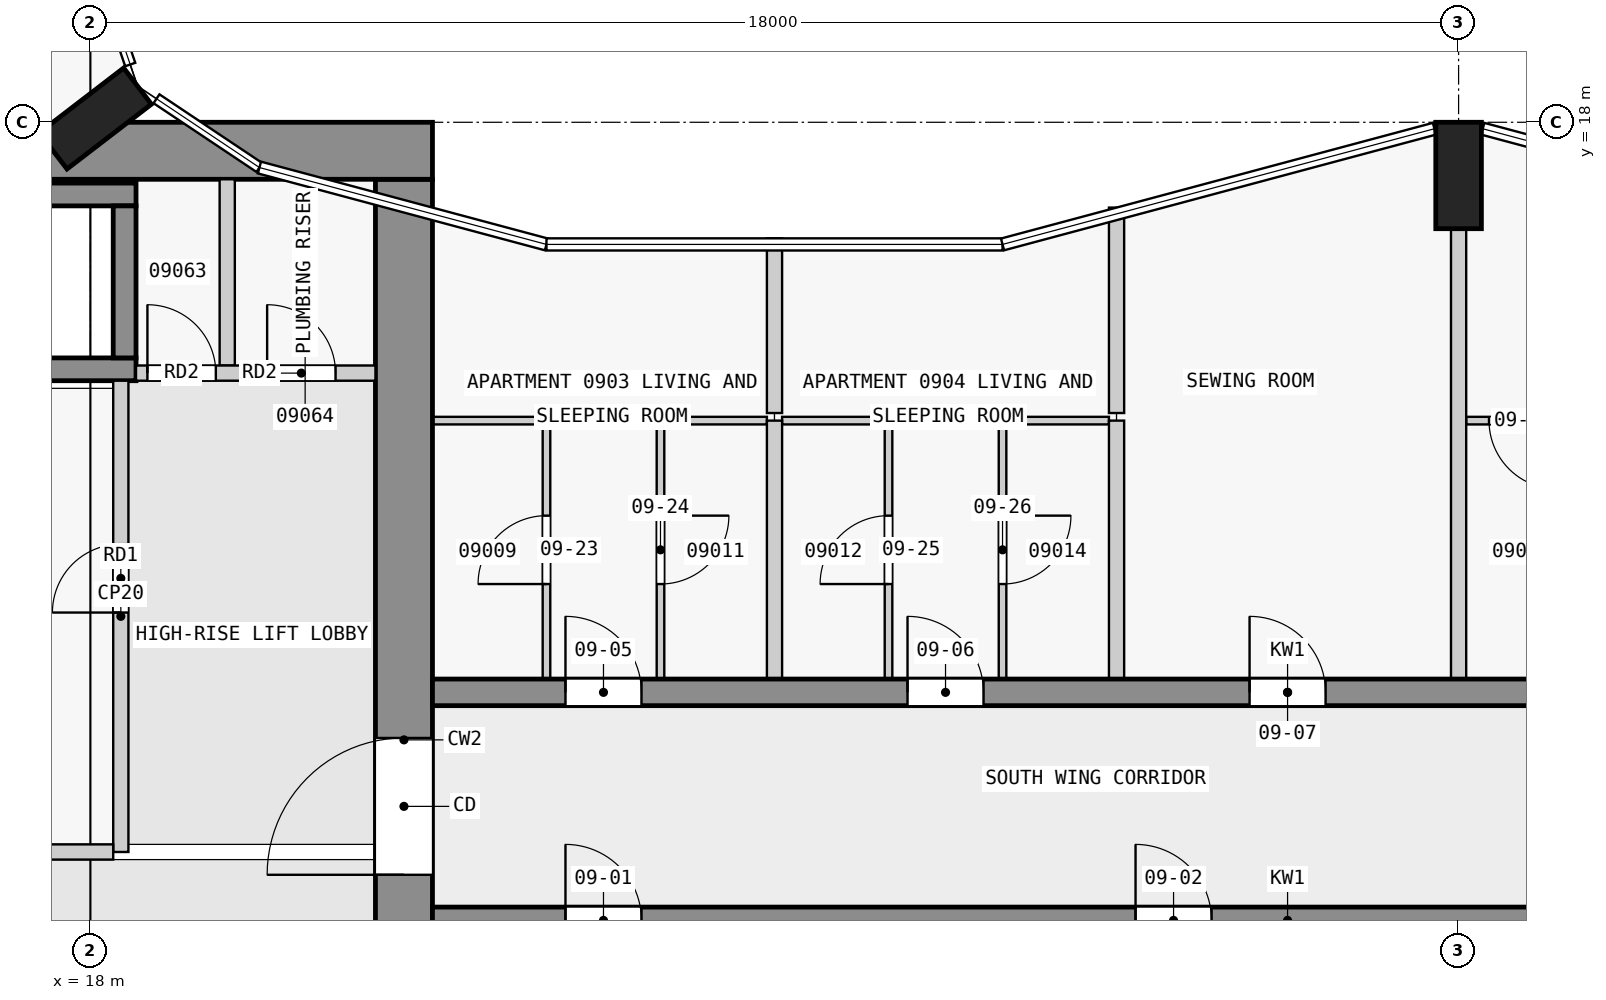
"""IFC4 building model, lengths in metres.
Left out: names, types, materials, properties, quantities, classifications, styles, units other than length and angle.
Written with IfcOpenShell. Run it as: python <this file> out.ifc"""

import sys

from ifc_helpers import new_model, si_unit, direction, frame, frame_2d, origin, origin_2d, place, context, subcontext, project, spatial, rectangle, extrude, element, fill, save


model = new_model("IFC4")
c1 = context("Model", 3, precision=1e-05, world=origin(), true_north=direction((0.0, 1.0)))
c2 = subcontext(c1, "Body", "Model", "MODEL_VIEW")
j1 = project(units=[si_unit("LENGTHUNIT", "METRE"), si_unit("PLANEANGLEUNIT", "RADIAN")], contexts=[c1])
p1 = place(None, origin())
s1 = spatial("IfcSite", under=j1, at=p1, CompositionType="ELEMENT")
p2 = place(p1, origin())
s2 = spatial("IfcBuilding", under=s1, at=p2, CompositionType="ELEMENT")
p3 = place(p2, frame((0.0, 0.0, 40.8)))
s3 = spatial("IfcBuildingStorey", under=s2, at=p3, CompositionType="ELEMENT", Elevation=40.8)
for number, where, z_axis, x_axis in (
    (1, (36.0, 17.3, 0.0), (0.0, 0.0, 1.0), (1.0, 0.0, 0.0)),
    (2, (18.065, 18.05, 0.0), (0.0, 0.0, 1.0), (-0.609, 0.793, 0.0)),
):
    element("IfcColumn", number, at=place(p3, frame(where, z_axis=z_axis, x_axis=x_axis)), inside=s3, PredefinedType="COLUMN", context=c2, shape_type="SweptSolid", body=[
        extrude(rectangle(XDim=0.6, YDim=1.4, at=origin_2d()), origin(), (0.0, 0.0, 1.0), 3.5),
    ])
p4 = place(p3, frame((1.55, 17.625, 0.0), z_axis=(0.0, 0.0, 1.0), x_axis=(1.0, 0.0, 0.0)))
e3 = element("IfcWall", 3, at=p4, inside=s3, PredefinedType="SHEAR", context=c2, shape_type="SweptSolid", body=[
    extrude(rectangle(XDim=20.95, YDim=0.75, at=frame_2d((10.475, 0.0))), origin(), (0.0, 0.0, 1.0), 3.25),
])
p5 = place(p4, frame((6.55, 0.0, 0.0)))
e4 = element("IfcOpeningElement", 4, at=p5, cuts=e3, PredefinedType="OPENING", context=c2, shape_type="SweptSolid", body=[
    extrude(rectangle(XDim=1.8, YDim=2.1, at=frame_2d((0.9, 1.05))), frame((0.0, 0.385, 0.0), z_axis=(0.0, -1.0, 0.0), x_axis=(1.0, 0.0, 0.0)), (0.0, 0.0, 1.0), 0.77),
])
p6 = place(p3, frame((22.125, 2.5, 0.0), z_axis=(0.0, 0.0, 1.0), x_axis=(0.0, 1.0, 0.0)))
e5 = element("IfcWall", 5, at=p6, inside=s3, PredefinedType="SHEAR", context=c2, shape_type="SweptSolid", body=[
    extrude(rectangle(XDim=14.75, YDim=0.75, at=frame_2d((7.375, 0.0))), origin(), (0.0, 0.0, 1.0), 3.25),
])
p7 = place(p6, frame((5.6, 0.0, 0.0)))
e6 = element("IfcOpeningElement", 6, at=p7, cuts=e5, PredefinedType="OPENING", context=c2, shape_type="SweptSolid", body=[
    extrude(rectangle(XDim=1.8, YDim=2.1, at=frame_2d((0.9, 1.05))), frame((0.0, 0.385, 0.0), z_axis=(0.0, -1.0, 0.0), x_axis=(1.0, 0.0, 0.0)), (0.0, 0.0, 1.0), 0.77),
])
for number, where, z_axis, x_axis in (
    (7, (10.8, 17.05, 0.0), (0.0, 0.0, 1.0), (1.0, 0.0, 0.0)),
    (8, (10.8, 14.75, 0.0), (0.0, 0.0, 1.0), (1.0, 0.0, 0.0)),
):
    element("IfcWall", number, at=place(p3, frame(where, z_axis=z_axis, x_axis=x_axis)), inside=s3, PredefinedType="SHEAR", context=c2, shape_type="SweptSolid", body=[
        extrude(rectangle(XDim=7.8, YDim=0.3, at=frame_2d((3.9, 0.0))), origin(), (0.0, 0.0, 1.0), 3.25),
    ])
p8 = place(p3, frame((18.45, 14.9, 0.0), z_axis=(0.0, 0.0, 1.0), x_axis=(0.0, 1.0, 0.0)))
e9 = element("IfcWall", 9, at=p8, inside=s3, PredefinedType="SHEAR", context=c2, shape_type="SweptSolid", body=[
    extrude(rectangle(XDim=2.0, YDim=0.3, at=frame_2d((1.0, 0.0))), origin(), (0.0, 0.0, 1.0), 3.25),
])
p9 = place(p3, frame((22.5, 7.5, 0.0), z_axis=(0.0, 0.0, 1.0), x_axis=(1.0, 0.0, 0.0)))
e10 = element("IfcWall", 10, at=p9, inside=s3, PredefinedType="SHEAR", context=c2, shape_type="SweptSolid", body=[
    extrude(rectangle(XDim=22.5, YDim=0.35, at=frame_2d((11.25, 0.0))), origin(), (0.0, 0.0, 1.0), 3.25),
])
p10 = place(p9, frame((1.75, 0.0, 0.0)))
e11 = element("IfcOpeningElement", 11, at=p10, cuts=e10, PredefinedType="OPENING", context=c2, shape_type="SweptSolid", body=[
    extrude(rectangle(XDim=1.0, YDim=2.1, at=frame_2d((0.5, 1.05))), frame((0.0, 0.185, 0.0), z_axis=(0.0, -1.0, 0.0), x_axis=(1.0, 0.0, 0.0)), (0.0, 0.0, 1.0), 0.37),
])
p11 = place(p9, frame((9.25, 0.0, 0.0)))
e12 = element("IfcOpeningElement", 12, at=p11, cuts=e10, PredefinedType="OPENING", context=c2, shape_type="SweptSolid", body=[
    extrude(rectangle(XDim=1.0, YDim=2.1, at=frame_2d((0.5, 1.05))), frame((0.0, 0.185, 0.0), z_axis=(0.0, -1.0, 0.0), x_axis=(1.0, 0.0, 0.0)), (0.0, 0.0, 1.0), 0.37),
])
p12 = place(p9, frame((18.75, 0.0, 0.0)))
e13 = element("IfcOpeningElement", 13, at=p12, cuts=e10, PredefinedType="OPENING", context=c2, shape_type="SweptSolid", body=[
    extrude(rectangle(XDim=0.9, YDim=2.1, at=frame_2d((0.45, 1.05))), frame((0.0, 0.185, 0.0), z_axis=(0.0, -1.0, 0.0), x_axis=(1.0, 0.0, 0.0)), (0.0, 0.0, 1.0), 0.37),
])
p13 = place(p9, frame((20.95, 0.0, 0.0)))
e14 = element("IfcOpeningElement", 14, at=p13, cuts=e10, PredefinedType="OPENING", context=c2, shape_type="SweptSolid", body=[
    extrude(rectangle(XDim=1.0, YDim=2.1, at=frame_2d((0.5, 1.05))), frame((0.0, 0.185, 0.0), z_axis=(0.0, -1.0, 0.0), x_axis=(1.0, 0.0, 0.0)), (0.0, 0.0, 1.0), 0.37),
])
p14 = place(p3, frame((22.5, 10.5, 0.0), z_axis=(0.0, 0.0, 1.0), x_axis=(1.0, 0.0, 0.0)))
e15 = element("IfcWall", 15, at=p14, inside=s3, PredefinedType="SHEAR", context=c2, shape_type="SweptSolid", body=[
    extrude(rectangle(XDim=22.5, YDim=0.35, at=frame_2d((11.25, 0.0))), origin(), (0.0, 0.0, 1.0), 3.25),
])
p15 = place(p14, frame((1.75, 0.0, 0.0)))
e16 = element("IfcOpeningElement", 16, at=p15, cuts=e15, PredefinedType="OPENING", context=c2, shape_type="SweptSolid", body=[
    extrude(rectangle(XDim=1.0, YDim=2.1, at=frame_2d((0.5, 1.05))), frame((0.0, 0.185, 0.0), z_axis=(0.0, -1.0, 0.0), x_axis=(1.0, 0.0, 0.0)), (0.0, 0.0, 1.0), 0.37),
])
p16 = place(p14, frame((6.25, 0.0, 0.0)))
e17 = element("IfcOpeningElement", 17, at=p16, cuts=e15, PredefinedType="OPENING", context=c2, shape_type="SweptSolid", body=[
    extrude(rectangle(XDim=1.0, YDim=2.1, at=frame_2d((0.5, 1.05))), frame((0.0, 0.185, 0.0), z_axis=(0.0, -1.0, 0.0), x_axis=(1.0, 0.0, 0.0)), (0.0, 0.0, 1.0), 0.37),
])
p17 = place(p14, frame((10.75, 0.0, 0.0)))
e18 = element("IfcOpeningElement", 18, at=p17, cuts=e15, PredefinedType="OPENING", context=c2, shape_type="SweptSolid", body=[
    extrude(rectangle(XDim=1.0, YDim=2.1, at=frame_2d((0.5, 1.05))), frame((0.0, 0.185, 0.0), z_axis=(0.0, -1.0, 0.0), x_axis=(1.0, 0.0, 0.0)), (0.0, 0.0, 1.0), 0.37),
])
p18 = place(p14, frame((16.85, 0.0, 0.0)))
e19 = element("IfcOpeningElement", 19, at=p18, cuts=e15, PredefinedType="OPENING", context=c2, shape_type="SweptSolid", body=[
    extrude(rectangle(XDim=1.0, YDim=2.1, at=frame_2d((0.5, 1.05))), frame((0.0, 0.185, 0.0), z_axis=(0.0, -1.0, 0.0), x_axis=(1.0, 0.0, 0.0)), (0.0, 0.0, 1.0), 0.37),
])
p19 = place(p3, frame((10.9, 8.4, 0.0), z_axis=(0.0, 0.0, 1.0), x_axis=(1.0, 0.0, 0.0)))
e20 = element("IfcWall", 20, at=p19, inside=s3, PredefinedType="PARTITIONING", context=c2, shape_type="SweptSolid", body=[
    extrude(rectangle(XDim=7.4, YDim=0.2, at=frame_2d((3.7, 0.0))), origin(), (0.0, 0.0, 1.0), 3.25),
])
p20 = place(p3, frame((18.4, 8.4, 0.0), z_axis=(0.0, 0.0, 1.0), x_axis=(0.0, 1.0, 0.0)))
e21 = element("IfcWall", 21, at=p20, inside=s3, PredefinedType="PARTITIONING", context=c2, shape_type="SweptSolid", body=[
    extrude(rectangle(XDim=6.2, YDim=0.2, at=frame_2d((3.1, 0.0))), origin(), (0.0, 0.0, 1.0), 3.25),
])
p21 = place(p20, frame((3.15, 0.0, 0.0)))
e22 = element("IfcOpeningElement", 22, at=p21, cuts=e21, PredefinedType="OPENING", context=c2, shape_type="SweptSolid", body=[
    extrude(rectangle(XDim=0.9, YDim=2.1, at=frame_2d((0.45, 1.05))), frame((0.0, 0.11, 0.0), z_axis=(0.0, -1.0, 0.0), x_axis=(1.0, 0.0, 0.0)), (0.0, 0.0, 1.0), 0.22),
])
p22 = place(p3, frame((18.6, 14.7, 0.0), z_axis=(0.0, 0.0, 1.0), x_axis=(1.0, 0.0, 0.0)))
e23 = element("IfcWall", 23, at=p22, inside=s3, PredefinedType="PARTITIONING", context=c2, shape_type="SweptSolid", body=[
    extrude(rectangle(XDim=3.15, YDim=0.2, at=frame_2d((1.575, 0.0))), origin(), (0.0, 0.0, 1.0), 3.25),
])
p23 = place(p22, frame((0.15, 0.0, 0.0)))
e24 = element("IfcOpeningElement", 24, at=p23, cuts=e23, PredefinedType="OPENING", context=c2, shape_type="SweptSolid", body=[
    extrude(rectangle(XDim=0.9, YDim=2.1, at=frame_2d((0.45, 1.05))), frame((0.0, 0.11, 0.0), z_axis=(0.0, -1.0, 0.0), x_axis=(1.0, 0.0, 0.0)), (0.0, 0.0, 1.0), 0.22),
])
p24 = place(p22, frame((1.725, 0.0, 0.0)))
e25 = element("IfcOpeningElement", 25, at=p24, cuts=e23, PredefinedType="OPENING", context=c2, shape_type="SweptSolid", body=[
    extrude(rectangle(XDim=0.9, YDim=2.1, at=frame_2d((0.45, 1.05))), frame((0.0, 0.11, 0.0), z_axis=(0.0, -1.0, 0.0), x_axis=(1.0, 0.0, 0.0)), (0.0, 0.0, 1.0), 0.22),
])
p25 = place(p3, frame((19.8, 14.8, 0.0), z_axis=(0.0, 0.0, 1.0), x_axis=(0.0, 1.0, 0.0)))
e26 = element("IfcWall", 26, at=p25, inside=s3, PredefinedType="PARTITIONING", context=c2, shape_type="SweptSolid", body=[
    extrude(rectangle(XDim=2.45, YDim=0.2, at=frame_2d((1.225, 0.0))), origin(), (0.0, 0.0, 1.0), 3.25),
])
p26 = place(p3, frame((23.95, 14.075, 0.0), z_axis=(0.0, 0.0, 1.0), x_axis=(-1.0, 0.0, 0.0)))
e27 = element("IfcWall", 27, at=p26, inside=s3, PredefinedType="PARTITIONING", context=c2, shape_type="SweptSolid", body=[
    extrude(rectangle(XDim=1.45, YDim=0.1, at=frame_2d((0.725, 0.0))), origin(), (0.0, 0.0, 1.0), 3.25),
])
for number, where, z_axis, x_axis in (
    (28, (26.9, 14.075, 0.0), (0.0, 0.0, 1.0), (-1.0, 0.0, 0.0)),
    (29, (28.45, 14.075, 0.0), (0.0, 0.0, 1.0), (-1.0, 0.0, 0.0)),
    (30, (31.4, 14.075, 0.0), (0.0, 0.0, 1.0), (-1.0, 0.0, 0.0)),
):
    element("IfcWall", number, at=place(p3, frame(where, z_axis=z_axis, x_axis=x_axis)), inside=s3, PredefinedType="PARTITIONING", context=c2, shape_type="SweptSolid", body=[
        extrude(rectangle(XDim=1.35, YDim=0.1, at=frame_2d((0.675, 0.0))), origin(), (0.0, 0.0, 1.0), 3.25),
    ])
p27 = place(p3, frame((37.55, 14.075, 0.0), z_axis=(0.0, 0.0, 1.0), x_axis=(-1.0, 0.0, 0.0)))
e31 = element("IfcWall", 31, at=p27, inside=s3, PredefinedType="PARTITIONING", context=c2, shape_type="SweptSolid", body=[
    extrude(rectangle(XDim=1.45, YDim=0.1, at=frame_2d((0.725, 0.0))), origin(), (0.0, 0.0, 1.0), 3.25),
])
p28 = place(p27, frame((0.25, 0.0, 0.0)))
e32 = element("IfcOpeningElement", 32, at=p28, cuts=e31, PredefinedType="OPENING", context=c2, shape_type="SweptSolid", body=[
    extrude(rectangle(XDim=0.9, YDim=2.1, at=frame_2d((0.45, 1.05))), frame((0.0, 0.06, 0.0), z_axis=(0.0, -1.0, 0.0), x_axis=(1.0, 0.0, 0.0)), (0.0, 0.0, 1.0), 0.12),
])
p29 = place(p3, frame((24.0, 10.675, 0.0), z_axis=(0.0, 0.0, 1.0), x_axis=(0.0, 1.0, 0.0)))
e33 = element("IfcWall", 33, at=p29, inside=s3, PredefinedType="PARTITIONING", context=c2, shape_type="SweptSolid", body=[
    extrude(rectangle(XDim=3.4, YDim=0.1, at=frame_2d((1.7, 0.0))), origin(), (0.0, 0.0, 1.0), 3.25),
])
p30 = place(p29, frame((1.25, 0.0, 0.0)))
e34 = element("IfcOpeningElement", 34, at=p30, cuts=e33, PredefinedType="OPENING", context=c2, shape_type="SweptSolid", body=[
    extrude(rectangle(XDim=0.9, YDim=2.1, at=frame_2d((0.45, 1.05))), frame((0.0, 0.06, 0.0), z_axis=(0.0, -1.0, 0.0), x_axis=(1.0, 0.0, 0.0)), (0.0, 0.0, 1.0), 0.12),
])
p31 = place(p3, frame((25.5, 14.075, 0.0), z_axis=(0.0, 0.0, 1.0), x_axis=(0.0, -1.0, 0.0)))
e35 = element("IfcWall", 35, at=p31, inside=s3, PredefinedType="PARTITIONING", context=c2, shape_type="SweptSolid", body=[
    extrude(rectangle(XDim=3.4, YDim=0.1, at=frame_2d((1.7, 0.0))), origin(), (0.0, 0.0, 1.0), 3.25),
])
p32 = place(p31, frame((1.25, 0.0, 0.0)))
e36 = element("IfcOpeningElement", 36, at=p32, cuts=e35, PredefinedType="OPENING", context=c2, shape_type="SweptSolid", body=[
    extrude(rectangle(XDim=0.9, YDim=2.1, at=frame_2d((0.45, 1.05))), frame((0.0, 0.06, 0.0), z_axis=(0.0, -1.0, 0.0), x_axis=(1.0, 0.0, 0.0)), (0.0, 0.0, 1.0), 0.12),
])
p33 = place(p3, frame((27.0, 16.473, 0.0), z_axis=(0.0, 0.0, 1.0), x_axis=(0.0, -1.0, 0.0)))
e37 = element("IfcWall", 37, at=p33, inside=s3, PredefinedType="PARTITIONING", context=c2, shape_type="SweptSolid", body=[
    extrude(rectangle(XDim=2.298, YDim=0.2, at=frame_2d((1.149, 0.0))), origin(), (0.0, 0.0, 1.0), 3.25),
])
p34 = place(p3, frame((27.0, 10.675, 0.0), z_axis=(0.0, 0.0, 1.0), x_axis=(0.0, 1.0, 0.0)))
e38 = element("IfcWall", 38, at=p34, inside=s3, PredefinedType="PARTITIONING", context=c2, shape_type="SweptSolid", body=[
    extrude(rectangle(XDim=3.4, YDim=0.2, at=frame_2d((1.7, 0.0))), origin(), (0.0, 0.0, 1.0), 3.25),
])
p35 = place(p3, frame((28.5, 10.675, 0.0), z_axis=(0.0, 0.0, 1.0), x_axis=(0.0, 1.0, 0.0)))
e39 = element("IfcWall", 39, at=p35, inside=s3, PredefinedType="PARTITIONING", context=c2, shape_type="SweptSolid", body=[
    extrude(rectangle(XDim=3.4, YDim=0.1, at=frame_2d((1.7, 0.0))), origin(), (0.0, 0.0, 1.0), 3.25),
])
p36 = place(p35, frame((1.25, 0.0, 0.0)))
e40 = element("IfcOpeningElement", 40, at=p36, cuts=e39, PredefinedType="OPENING", context=c2, shape_type="SweptSolid", body=[
    extrude(rectangle(XDim=0.9, YDim=2.1, at=frame_2d((0.45, 1.05))), frame((0.0, 0.06, 0.0), z_axis=(0.0, -1.0, 0.0), x_axis=(1.0, 0.0, 0.0)), (0.0, 0.0, 1.0), 0.12),
])
p37 = place(p3, frame((30.0, 14.075, 0.0), z_axis=(0.0, 0.0, 1.0), x_axis=(0.0, -1.0, 0.0)))
e41 = element("IfcWall", 41, at=p37, inside=s3, PredefinedType="PARTITIONING", context=c2, shape_type="SweptSolid", body=[
    extrude(rectangle(XDim=3.4, YDim=0.1, at=frame_2d((1.7, 0.0))), origin(), (0.0, 0.0, 1.0), 3.25),
])
p38 = place(p37, frame((1.25, 0.0, 0.0)))
e42 = element("IfcOpeningElement", 42, at=p38, cuts=e41, PredefinedType="OPENING", context=c2, shape_type="SweptSolid", body=[
    extrude(rectangle(XDim=0.9, YDim=2.1, at=frame_2d((0.45, 1.05))), frame((0.0, 0.06, 0.0), z_axis=(0.0, -1.0, 0.0), x_axis=(1.0, 0.0, 0.0)), (0.0, 0.0, 1.0), 0.12),
])
p39 = place(p3, frame((31.5, 16.878, 0.0), z_axis=(0.0, 0.0, 1.0), x_axis=(0.0, -1.0, 0.0)))
e43 = element("IfcWall", 43, at=p39, inside=s3, PredefinedType="PARTITIONING", context=c2, shape_type="SweptSolid", body=[
    extrude(rectangle(XDim=2.703, YDim=0.2, at=frame_2d((1.351, 0.0))), origin(), (0.0, 0.0, 1.0), 3.25),
])
p40 = place(p3, frame((31.5, 10.675, 0.0), z_axis=(0.0, 0.0, 1.0), x_axis=(0.0, 1.0, 0.0)))
e44 = element("IfcWall", 44, at=p40, inside=s3, PredefinedType="PARTITIONING", context=c2, shape_type="SweptSolid", body=[
    extrude(rectangle(XDim=3.4, YDim=0.2, at=frame_2d((1.7, 0.0))), origin(), (0.0, 0.0, 1.0), 3.25),
])
p41 = place(p3, frame((36.0, 10.675, 0.0), z_axis=(0.0, 0.0, 1.0), x_axis=(0.0, 1.0, 0.0)))
e45 = element("IfcWall", 45, at=p41, inside=s3, PredefinedType="PARTITIONING", context=c2, shape_type="SweptSolid", body=[
    extrude(rectangle(XDim=5.925, YDim=0.2, at=frame_2d((2.962, 0.0))), origin(), (0.0, 0.0, 1.0), 3.25),
])
p42 = place(p21, origin())
e46 = element("IfcDoor", 46, at=p42, inside=s3, OperationType="SINGLE_SWING_LEFT", PredefinedType="DOOR", context=c2, shape_type="SweptSolid", body=[
    extrude(rectangle(XDim=0.9, YDim=2.1, at=frame_2d((0.45, 1.05))), frame((0.0, 0.025, 0.0), z_axis=(0.0, -1.0, 0.0), x_axis=(1.0, 0.0, 0.0)), (0.0, 0.0, 1.0), 0.05),
])
fill(e22, e46)
p43 = place(p7, origin())
e47 = element("IfcDoor", 47, at=p43, inside=s3, OperationType="DOUBLE_DOOR_SINGLE_SWING", PredefinedType="DOOR", context=c2, shape_type="SweptSolid", body=[
    extrude(rectangle(XDim=1.8, YDim=2.1, at=frame_2d((0.9, 1.05))), frame((0.0, 0.025, 0.0), z_axis=(0.0, -1.0, 0.0), x_axis=(1.0, 0.0, 0.0)), (0.0, 0.0, 1.0), 0.05),
])
fill(e6, e47)
p44 = place(p23, origin())
e48 = element("IfcDoor", 48, at=p44, inside=s3, OperationType="SINGLE_SWING_LEFT", PredefinedType="DOOR", context=c2, shape_type="SweptSolid", body=[
    extrude(rectangle(XDim=0.9, YDim=2.1, at=frame_2d((0.45, 1.05))), frame((0.0, 0.025, 0.0), z_axis=(0.0, -1.0, 0.0), x_axis=(1.0, 0.0, 0.0)), (0.0, 0.0, 1.0), 0.05),
])
fill(e24, e48)
p45 = place(p24, origin())
e49 = element("IfcDoor", 49, at=p45, inside=s3, OperationType="SINGLE_SWING_LEFT", PredefinedType="DOOR", context=c2, shape_type="SweptSolid", body=[
    extrude(rectangle(XDim=0.9, YDim=2.1, at=frame_2d((0.45, 1.05))), frame((0.0, 0.025, 0.0), z_axis=(0.0, -1.0, 0.0), x_axis=(1.0, 0.0, 0.0)), (0.0, 0.0, 1.0), 0.05),
])
fill(e25, e49)
p46 = place(p10, origin())
e50 = element("IfcDoor", 50, at=p46, inside=s3, OperationType="SINGLE_SWING_LEFT", PredefinedType="DOOR", context=c2, shape_type="SweptSolid", body=[
    extrude(rectangle(XDim=1.0, YDim=2.1, at=frame_2d((0.5, 1.05))), frame((0.0, 0.025, 0.0), z_axis=(0.0, -1.0, 0.0), x_axis=(1.0, 0.0, 0.0)), (0.0, 0.0, 1.0), 0.05),
])
fill(e11, e50)
p47 = place(p11, origin())
e51 = element("IfcDoor", 51, at=p47, inside=s3, OperationType="SINGLE_SWING_LEFT", PredefinedType="DOOR", context=c2, shape_type="SweptSolid", body=[
    extrude(rectangle(XDim=1.0, YDim=2.1, at=frame_2d((0.5, 1.05))), frame((0.0, 0.025, 0.0), z_axis=(0.0, -1.0, 0.0), x_axis=(1.0, 0.0, 0.0)), (0.0, 0.0, 1.0), 0.05),
])
fill(e12, e51)
p48 = place(p15, origin())
e52 = element("IfcDoor", 52, at=p48, inside=s3, OperationType="SINGLE_SWING_LEFT", PredefinedType="DOOR", context=c2, shape_type="SweptSolid", body=[
    extrude(rectangle(XDim=1.0, YDim=2.1, at=frame_2d((0.5, 1.05))), frame((0.0, 0.025, 0.0), z_axis=(0.0, -1.0, 0.0), x_axis=(1.0, 0.0, 0.0)), (0.0, 0.0, 1.0), 0.05),
])
fill(e16, e52)
p49 = place(p16, origin())
e53 = element("IfcDoor", 53, at=p49, inside=s3, OperationType="SINGLE_SWING_LEFT", PredefinedType="DOOR", context=c2, shape_type="SweptSolid", body=[
    extrude(rectangle(XDim=1.0, YDim=2.1, at=frame_2d((0.5, 1.05))), frame((0.0, 0.025, 0.0), z_axis=(0.0, -1.0, 0.0), x_axis=(1.0, 0.0, 0.0)), (0.0, 0.0, 1.0), 0.05),
])
fill(e17, e53)
p50 = place(p17, origin())
e54 = element("IfcDoor", 54, at=p50, inside=s3, OperationType="SINGLE_SWING_LEFT", PredefinedType="DOOR", context=c2, shape_type="SweptSolid", body=[
    extrude(rectangle(XDim=1.0, YDim=2.1, at=frame_2d((0.5, 1.05))), frame((0.0, 0.025, 0.0), z_axis=(0.0, -1.0, 0.0), x_axis=(1.0, 0.0, 0.0)), (0.0, 0.0, 1.0), 0.05),
])
fill(e18, e54)
p51 = place(p30, origin())
e55 = element("IfcDoor", 55, at=p51, inside=s3, OperationType="SINGLE_SWING_RIGHT", PredefinedType="DOOR", context=c2, shape_type="SweptSolid", body=[
    extrude(rectangle(XDim=0.9, YDim=2.1, at=frame_2d((0.45, 1.05))), frame((0.0, 0.025, 0.0), z_axis=(0.0, -1.0, 0.0), x_axis=(1.0, 0.0, 0.0)), (0.0, 0.0, 1.0), 0.05),
])
fill(e34, e55)
p52 = place(p32, origin())
e56 = element("IfcDoor", 56, at=p52, inside=s3, OperationType="SINGLE_SWING_RIGHT", PredefinedType="DOOR", context=c2, shape_type="SweptSolid", body=[
    extrude(rectangle(XDim=0.9, YDim=2.1, at=frame_2d((0.45, 1.05))), frame((0.0, 0.025, 0.0), z_axis=(0.0, -1.0, 0.0), x_axis=(1.0, 0.0, 0.0)), (0.0, 0.0, 1.0), 0.05),
])
fill(e36, e56)
p53 = place(p36, origin())
e57 = element("IfcDoor", 57, at=p53, inside=s3, OperationType="SINGLE_SWING_RIGHT", PredefinedType="DOOR", context=c2, shape_type="SweptSolid", body=[
    extrude(rectangle(XDim=0.9, YDim=2.1, at=frame_2d((0.45, 1.05))), frame((0.0, 0.025, 0.0), z_axis=(0.0, -1.0, 0.0), x_axis=(1.0, 0.0, 0.0)), (0.0, 0.0, 1.0), 0.05),
])
fill(e40, e57)
p54 = place(p38, origin())
e58 = element("IfcDoor", 58, at=p54, inside=s3, OperationType="SINGLE_SWING_RIGHT", PredefinedType="DOOR", context=c2, shape_type="SweptSolid", body=[
    extrude(rectangle(XDim=0.9, YDim=2.1, at=frame_2d((0.45, 1.05))), frame((0.0, 0.025, 0.0), z_axis=(0.0, -1.0, 0.0), x_axis=(1.0, 0.0, 0.0)), (0.0, 0.0, 1.0), 0.05),
])
fill(e42, e58)
p55 = place(p28, origin())
e59 = element("IfcDoor", 59, at=p55, inside=s3, OperationType="SINGLE_SWING_LEFT", PredefinedType="DOOR", context=c2, shape_type="SweptSolid", body=[
    extrude(rectangle(XDim=0.9, YDim=2.1, at=frame_2d((0.45, 1.05))), frame((0.0, 0.025, 0.0), z_axis=(0.0, -1.0, 0.0), x_axis=(1.0, 0.0, 0.0)), (0.0, 0.0, 1.0), 0.05),
])
fill(e32, e59)
save(model, sys.argv[1])
